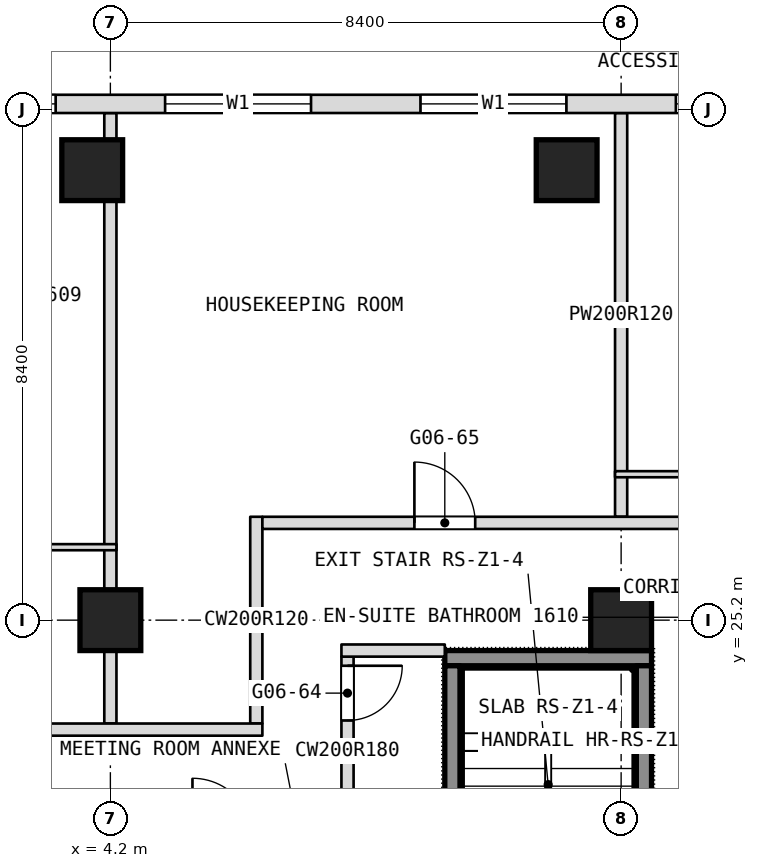
"""IFC4 building model, lengths in metres.
Left out: names, types, materials, properties, quantities, classifications, styles, units other than length and angle.
Written with IfcOpenShell. Run it as: python <this file> out.ifc"""

import sys

from ifc_helpers import new_model, si_unit, direction, frame, frame_2d, origin, origin_2d, place, context, subcontext, project, spatial, rectangle, extrude, element, fill, save


model = new_model("IFC4")
c1 = context("Model", 3, precision=1e-05, world=origin(), true_north=direction((0.0, 1.0)))
c2 = subcontext(c1, "Body", "Model", "MODEL_VIEW")
j1 = project(units=[si_unit("LENGTHUNIT", "METRE"), si_unit("PLANEANGLEUNIT", "RADIAN")], contexts=[c1])
p1 = place(None, origin())
s1 = spatial("IfcSite", under=j1, at=p1, CompositionType="ELEMENT")
p2 = place(p1, origin())
s2 = spatial("IfcBuilding", under=s1, at=p2, CompositionType="ELEMENT")
p3 = place(p2, frame((0.0, 0.0, 72.5)))
s3 = spatial("IfcBuildingStorey", under=s2, at=p3, CompositionType="ELEMENT", Elevation=72.5)
for number, where, z_axis, x_axis in (
    (1, (4.2, 25.2, 0.0), (0.0, 0.0, 1.0), (1.0, 0.0, 0.0)),
    (2, (12.6, 25.2, 0.0), (0.0, 0.0, 1.0), (1.0, 0.0, 0.0)),
    (3, (3.901, 32.6, 0.0), (0.0, 0.0, 1.0), (1.0, 0.0, 0.0)),
    (4, (11.704, 32.6, 0.0), (0.0, 0.0, 1.0), (1.0, 0.0, 0.0)),
):
    element("IfcColumn", number, at=place(p3, frame(where, z_axis=z_axis, x_axis=x_axis)), inside=s3, PredefinedType="COLUMN", context=c2, shape_type="SweptSolid", body=[
        extrude(rectangle(XDim=1.0, YDim=1.0, at=origin_2d()), origin(), (0.0, 0.0, 1.0), 3.6),
    ])
p4 = place(p3, frame((12.6, 26.9, 0.0), z_axis=(0.0, 0.0, 1.0), x_axis=(0.0, 1.0, 0.0)))
e5 = element("IfcWall", 5, at=p4, inside=s3, PredefinedType="PARTITIONING", context=c2, shape_type="SweptSolid", body=[
    extrude(rectangle(XDim=6.64, YDim=0.2, at=frame_2d((3.32, 0.0))), origin(), (0.0, 0.0, 1.0), 3.34),
])
p5 = place(p3, frame((8.1, 21.5, 0.0), z_axis=(0.0, 0.0, 1.0), x_axis=(0.0, 1.0, 0.0)))
e6 = element("IfcWall", 6, at=p5, inside=s3, PredefinedType="PARTITIONING", context=c2, shape_type="SweptSolid", body=[
    extrude(rectangle(XDim=3.1, YDim=0.2, at=frame_2d((1.55, 0.0))), origin(), (0.0, 0.0, 1.0), 3.34),
])
p6 = place(p5, frame((2.05, 0.0, 0.0)))
e7 = element("IfcOpeningElement", 7, at=p6, cuts=e6, PredefinedType="OPENING", context=c2, shape_type="SweptSolid", body=[
    extrude(rectangle(XDim=0.9, YDim=2.1, at=frame_2d((0.45, 1.05))), frame((0.0, 0.1, 0.0), z_axis=(0.0, -1.0, 0.0), x_axis=(1.0, 0.0, 0.0)), (0.0, 0.0, 1.0), 0.2),
])
p7 = place(p3, frame((6.6, 23.5, 0.0), z_axis=(0.0, 0.0, 1.0), x_axis=(0.0, 1.0, 0.0)))
e8 = element("IfcWall", 8, at=p7, inside=s3, PredefinedType="PARTITIONING", context=c2, shape_type="SweptSolid", body=[
    extrude(rectangle(XDim=3.4, YDim=0.2, at=frame_2d((1.7, 0.0))), origin(), (0.0, 0.0, 1.0), 3.34),
])
p8 = place(p3, frame((4.2, 23.5, 0.0), z_axis=(0.0, 0.0, 1.0), x_axis=(0.0, 1.0, 0.0)))
e9 = element("IfcWall", 9, at=p8, inside=s3, PredefinedType="PARTITIONING", context=c2, shape_type="SweptSolid", body=[
    extrude(rectangle(XDim=10.04, YDim=0.2, at=frame_2d((5.02, 0.0))), origin(), (0.0, 0.0, 1.0), 3.34),
])
p9 = place(p3, frame((-16.7, 23.4, 0.0), z_axis=(0.0, 0.0, 1.0), x_axis=(1.0, 0.0, 0.0)))
e10 = element("IfcWall", 10, at=p9, inside=s3, PredefinedType="PARTITIONING", context=c2, shape_type="SweptSolid", body=[
    extrude(rectangle(XDim=23.4, YDim=0.2, at=frame_2d((11.7, 0.0))), origin(), (0.0, 0.0, 1.0), 3.34),
])
p10 = place(p9, frame((2.4, 0.0, 0.0)))
e11 = element("IfcOpeningElement", 11, at=p10, cuts=e10, PredefinedType="OPENING", context=c2, shape_type="SweptSolid", body=[
    extrude(rectangle(XDim=0.9, YDim=2.1, at=frame_2d((0.45, 1.05))), frame((0.0, 0.1, 0.0), z_axis=(0.0, -1.0, 0.0), x_axis=(1.0, 0.0, 0.0)), (0.0, 0.0, 1.0), 0.2),
])
p11 = place(p9, frame((5.65, 0.0, 0.0)))
e12 = element("IfcOpeningElement", 12, at=p11, cuts=e10, PredefinedType="OPENING", context=c2, shape_type="SweptSolid", body=[
    extrude(rectangle(XDim=1.1, YDim=2.1, at=frame_2d((0.55, 1.05))), frame((0.0, 0.1, 0.0), z_axis=(0.0, -1.0, 0.0), x_axis=(1.0, 0.0, 0.0)), (0.0, 0.0, 1.0), 0.2),
])
p12 = place(p9, frame((15.3, 0.0, 0.0)))
e13 = element("IfcOpeningElement", 13, at=p12, cuts=e10, PredefinedType="OPENING", context=c2, shape_type="SweptSolid", body=[
    extrude(rectangle(XDim=1.0, YDim=2.1, at=frame_2d((0.5, 1.05))), frame((0.0, 0.1, 0.0), z_axis=(0.0, -1.0, 0.0), x_axis=(1.0, 0.0, 0.0)), (0.0, 0.0, 1.0), 0.2),
])
p13 = place(p9, frame((17.1, 0.0, 0.0)))
e14 = element("IfcOpeningElement", 14, at=p13, cuts=e10, PredefinedType="OPENING", context=c2, shape_type="SweptSolid", body=[
    extrude(rectangle(XDim=1.0, YDim=2.1, at=frame_2d((0.5, 1.05))), frame((0.0, 0.1, 0.0), z_axis=(0.0, -1.0, 0.0), x_axis=(1.0, 0.0, 0.0)), (0.0, 0.0, 1.0), 0.2),
])
p14 = place(p3, frame((8.0, 24.7, 0.0), z_axis=(0.0, 0.0, 1.0), x_axis=(1.0, 0.0, 0.0)))
e15 = element("IfcWall", 15, at=p14, inside=s3, PredefinedType="PARTITIONING", context=c2, shape_type="SweptSolid", body=[
    extrude(rectangle(XDim=1.7, YDim=0.2, at=frame_2d((0.85, 0.0))), origin(), (0.0, 0.0, 1.0), 3.34),
])
p15 = place(p3, frame((1.75, 26.4, 0.0), z_axis=(0.0, 0.0, 1.0), x_axis=(1.0, 0.0, 0.0)))
e16 = element("IfcWall", 16, at=p15, inside=s3, PredefinedType="PARTITIONING", context=c2, shape_type="SweptSolid", body=[
    extrude(rectangle(XDim=2.55, YDim=0.1, at=frame_2d((1.275, 0.0))), origin(), (0.0, 0.0, 1.0), 3.34),
])
p16 = place(p15, frame((0.15, 0.0, 0.0)))
e17 = element("IfcOpeningElement", 17, at=p16, cuts=e16, PredefinedType="OPENING", context=c2, shape_type="SweptSolid", body=[
    extrude(rectangle(XDim=0.9, YDim=2.1, at=frame_2d((0.45, 1.05))), frame((0.0, 0.05, 0.0), z_axis=(0.0, -1.0, 0.0), x_axis=(1.0, 0.0, 0.0)), (0.0, 0.0, 1.0), 0.1),
])
p17 = place(p3, frame((6.7, 26.8, 0.0), z_axis=(0.0, 0.0, 1.0), x_axis=(1.0, 0.0, 0.0)))
e18 = element("IfcWall", 18, at=p17, inside=s3, PredefinedType="PARTITIONING", context=c2, shape_type="SweptSolid", body=[
    extrude(rectangle(XDim=8.0, YDim=0.2, at=frame_2d((4.0, 0.0))), origin(), (0.0, 0.0, 1.0), 3.34),
])
p18 = place(p17, frame((2.5, 0.0, 0.0)))
e19 = element("IfcOpeningElement", 19, at=p18, cuts=e18, PredefinedType="OPENING", context=c2, shape_type="SweptSolid", body=[
    extrude(rectangle(XDim=1.0, YDim=2.1, at=frame_2d((0.5, 1.05))), frame((0.0, 0.1, 0.0), z_axis=(0.0, -1.0, 0.0), x_axis=(1.0, 0.0, 0.0)), (0.0, 0.0, 1.0), 0.2),
])
p19 = place(p3, frame((12.5, 27.6, 0.0), z_axis=(0.0, 0.0, 1.0), x_axis=(1.0, 0.0, 0.0)))
e20 = element("IfcWall", 20, at=p19, inside=s3, PredefinedType="PARTITIONING", context=c2, shape_type="SweptSolid", body=[
    extrude(rectangle(XDim=2.45, YDim=0.1, at=frame_2d((1.225, 0.0))), origin(), (0.0, 0.0, 1.0), 3.34),
])
p20 = place(p19, frame((1.4, 0.0, 0.0)))
e21 = element("IfcOpeningElement", 21, at=p20, cuts=e20, PredefinedType="OPENING", context=c2, shape_type="SweptSolid", body=[
    extrude(rectangle(XDim=0.9, YDim=2.1, at=frame_2d((0.45, 1.05))), frame((0.0, 0.05, 0.0), z_axis=(0.0, -1.0, 0.0), x_axis=(1.0, 0.0, 0.0)), (0.0, 0.0, 1.0), 0.1),
])
p21 = place(p3, frame((23.406, 33.69, 0.0), z_axis=(0.0, 0.0, 1.0), x_axis=(-1.0, 0.0, 0.0)))
e22 = element("IfcWall", 22, at=p21, inside=s3, PredefinedType="NOTDEFINED", context=c2, shape_type="SweptSolid", body=[
    extrude(rectangle(XDim=46.812, YDim=0.3, at=frame_2d((23.406, 0.0))), origin(), (0.0, 0.0, 1.0), 3.6),
])
p22 = place(p21, frame((2.186, 0.0, 0.9)))
e23 = element("IfcOpeningElement", 23, at=p22, cuts=e22, PredefinedType="OPENING", context=c2, shape_type="SweptSolid", body=[
    extrude(rectangle(XDim=2.4, YDim=2.1, at=frame_2d((1.2, 1.05))), frame((0.0, 0.15, 0.0), z_axis=(0.0, -1.0, 0.0), x_axis=(1.0, 0.0, 0.0)), (0.0, 0.0, 1.0), 0.3),
])
p23 = place(p21, frame((7.506, 0.0, 0.9)))
e24 = element("IfcOpeningElement", 24, at=p23, cuts=e22, PredefinedType="OPENING", context=c2, shape_type="SweptSolid", body=[
    extrude(rectangle(XDim=2.4, YDim=2.1, at=frame_2d((1.2, 1.05))), frame((0.0, 0.15, 0.0), z_axis=(0.0, -1.0, 0.0), x_axis=(1.0, 0.0, 0.0)), (0.0, 0.0, 1.0), 0.3),
])
p24 = place(p21, frame((11.706, 0.0, 0.9)))
e25 = element("IfcOpeningElement", 25, at=p24, cuts=e22, PredefinedType="OPENING", context=c2, shape_type="SweptSolid", body=[
    extrude(rectangle(XDim=2.4, YDim=2.1, at=frame_2d((1.2, 1.05))), frame((0.0, 0.15, 0.0), z_axis=(0.0, -1.0, 0.0), x_axis=(1.0, 0.0, 0.0)), (0.0, 0.0, 1.0), 0.3),
])
p25 = place(p21, frame((15.906, 0.0, 0.9)))
e26 = element("IfcOpeningElement", 26, at=p25, cuts=e22, PredefinedType="OPENING", context=c2, shape_type="SweptSolid", body=[
    extrude(rectangle(XDim=2.4, YDim=2.1, at=frame_2d((1.2, 1.05))), frame((0.0, 0.15, 0.0), z_axis=(0.0, -1.0, 0.0), x_axis=(1.0, 0.0, 0.0)), (0.0, 0.0, 1.0), 0.3),
])
p26 = place(p21, frame((20.106, 0.0, 0.9)))
e27 = element("IfcOpeningElement", 27, at=p26, cuts=e22, PredefinedType="OPENING", context=c2, shape_type="SweptSolid", body=[
    extrude(rectangle(XDim=2.4, YDim=2.1, at=frame_2d((1.2, 1.05))), frame((0.0, 0.15, 0.0), z_axis=(0.0, -1.0, 0.0), x_axis=(1.0, 0.0, 0.0)), (0.0, 0.0, 1.0), 0.3),
])
p27 = place(p21, frame((24.306, 0.0, 0.9)))
e28 = element("IfcOpeningElement", 28, at=p27, cuts=e22, PredefinedType="OPENING", context=c2, shape_type="SweptSolid", body=[
    extrude(rectangle(XDim=2.4, YDim=2.1, at=frame_2d((1.2, 1.05))), frame((0.0, 0.15, 0.0), z_axis=(0.0, -1.0, 0.0), x_axis=(1.0, 0.0, 0.0)), (0.0, 0.0, 1.0), 0.3),
])
p28 = place(p21, frame((28.506, 0.0, 0.9)))
e29 = element("IfcOpeningElement", 29, at=p28, cuts=e22, PredefinedType="OPENING", context=c2, shape_type="SweptSolid", body=[
    extrude(rectangle(XDim=2.4, YDim=2.1, at=frame_2d((1.2, 1.05))), frame((0.0, 0.15, 0.0), z_axis=(0.0, -1.0, 0.0), x_axis=(1.0, 0.0, 0.0)), (0.0, 0.0, 1.0), 0.3),
])
p29 = place(p21, frame((32.706, 0.0, 0.9)))
e30 = element("IfcOpeningElement", 30, at=p29, cuts=e22, PredefinedType="OPENING", context=c2, shape_type="SweptSolid", body=[
    extrude(rectangle(XDim=2.4, YDim=2.1, at=frame_2d((1.2, 1.05))), frame((0.0, 0.15, 0.0), z_axis=(0.0, -1.0, 0.0), x_axis=(1.0, 0.0, 0.0)), (0.0, 0.0, 1.0), 0.3),
])
p30 = place(p21, frame((36.906, 0.0, 0.9)))
e31 = element("IfcOpeningElement", 31, at=p30, cuts=e22, PredefinedType="OPENING", context=c2, shape_type="SweptSolid", body=[
    extrude(rectangle(XDim=2.4, YDim=2.1, at=frame_2d((1.2, 1.05))), frame((0.0, 0.15, 0.0), z_axis=(0.0, -1.0, 0.0), x_axis=(1.0, 0.0, 0.0)), (0.0, 0.0, 1.0), 0.3),
])
p31 = place(p21, frame((42.226, 0.0, 0.9)))
e32 = element("IfcOpeningElement", 32, at=p31, cuts=e22, PredefinedType="OPENING", context=c2, shape_type="SweptSolid", body=[
    extrude(rectangle(XDim=2.4, YDim=2.1, at=frame_2d((1.2, 1.05))), frame((0.0, 0.15, 0.0), z_axis=(0.0, -1.0, 0.0), x_axis=(1.0, 0.0, 0.0)), (0.0, 0.0, 1.0), 0.3),
])
p32 = place(p3, frame((9.7, 24.575, 0.1), z_axis=(0.0, 0.0, 1.0), x_axis=(1.0, 0.0, 0.0)))
e33 = element("IfcWall", 33, at=p32, inside=s3, PredefinedType="SHEAR", context=c2, shape_type="SweptSolid", body=[
    extrude(rectangle(XDim=3.4, YDim=0.25, at=frame_2d((1.7, 0.0))), origin(), (0.0, 0.0, 1.0), 3.6),
])
p33 = place(p3, frame((9.825, 18.75, 0.1), z_axis=(0.0, 0.0, 1.0), x_axis=(0.0, 1.0, 0.0)))
e34 = element("IfcWall", 34, at=p33, inside=s3, PredefinedType="SHEAR", context=c2, shape_type="SweptSolid", body=[
    extrude(rectangle(XDim=5.7, YDim=0.25, at=frame_2d((2.85, 0.0))), origin(), (0.0, 0.0, 1.0), 3.6),
])
p34 = place(p33, frame((0.2, 0.0, 0.0)))
e35 = element("IfcOpeningElement", 35, at=p34, cuts=e34, PredefinedType="OPENING", context=c2, shape_type="SweptSolid", body=[
    extrude(rectangle(XDim=1.0, YDim=2.1, at=frame_2d((0.5, 1.05))), frame((0.0, 0.125, 0.0), z_axis=(0.0, -1.0, 0.0), x_axis=(1.0, 0.0, 0.0)), (0.0, 0.0, 1.0), 0.25),
])
p35 = place(p3, frame((12.975, 18.75, 0.1), z_axis=(0.0, 0.0, 1.0), x_axis=(0.0, 1.0, 0.0)))
e36 = element("IfcWall", 36, at=p35, inside=s3, PredefinedType="SHEAR", context=c2, shape_type="SweptSolid", body=[
    extrude(rectangle(XDim=5.7, YDim=0.25, at=frame_2d((2.85, 0.0))), origin(), (0.0, 0.0, 1.0), 3.6),
])
p36 = place(p6, origin())
e37 = element("IfcDoor", 37, at=p36, inside=s3, OperationType="SINGLE_SWING_LEFT", PredefinedType="DOOR", context=c2, shape_type="SweptSolid", body=[
    extrude(rectangle(XDim=0.9, YDim=2.1, at=frame_2d((0.45, 1.05))), frame((0.0, 0.025, 0.0), z_axis=(0.0, -1.0, 0.0), x_axis=(1.0, 0.0, 0.0)), (0.0, 0.0, 1.0), 0.05),
])
fill(e7, e37)
p37 = place(p18, origin())
e38 = element("IfcDoor", 38, at=p37, inside=s3, OperationType="SINGLE_SWING_LEFT", PredefinedType="DOOR", context=c2, shape_type="SweptSolid", body=[
    extrude(rectangle(XDim=1.0, YDim=2.1, at=frame_2d((0.5, 1.05))), frame((0.0, 0.025, 0.0), z_axis=(0.0, -1.0, 0.0), x_axis=(1.0, 0.0, 0.0)), (0.0, 0.0, 1.0), 0.05),
])
fill(e19, e38)
p38 = place(p23, origin())
e39 = element("IfcWindow", 39, at=p38, inside=s3, PartitioningType="SINGLE_PANEL", PredefinedType="WINDOW", context=c2, shape_type="SweptSolid", body=[
    extrude(rectangle(XDim=2.4, YDim=2.1, at=frame_2d((1.2, 1.05))), frame((0.0, 0.03, 0.0), z_axis=(0.0, -1.0, 0.0), x_axis=(1.0, 0.0, 0.0)), (0.0, 0.0, 1.0), 0.06),
])
fill(e24, e39)
p39 = place(p24, origin())
e40 = element("IfcWindow", 40, at=p39, inside=s3, PartitioningType="SINGLE_PANEL", PredefinedType="WINDOW", context=c2, shape_type="SweptSolid", body=[
    extrude(rectangle(XDim=2.4, YDim=2.1, at=frame_2d((1.2, 1.05))), frame((0.0, 0.03, 0.0), z_axis=(0.0, -1.0, 0.0), x_axis=(1.0, 0.0, 0.0)), (0.0, 0.0, 1.0), 0.06),
])
fill(e25, e40)
p40 = place(p25, origin())
e41 = element("IfcWindow", 41, at=p40, inside=s3, PartitioningType="SINGLE_PANEL", PredefinedType="WINDOW", context=c2, shape_type="SweptSolid", body=[
    extrude(rectangle(XDim=2.4, YDim=2.1, at=frame_2d((1.2, 1.05))), frame((0.0, 0.03, 0.0), z_axis=(0.0, -1.0, 0.0), x_axis=(1.0, 0.0, 0.0)), (0.0, 0.0, 1.0), 0.06),
])
fill(e26, e41)
p41 = place(p26, origin())
e42 = element("IfcWindow", 42, at=p41, inside=s3, PartitioningType="SINGLE_PANEL", PredefinedType="WINDOW", context=c2, shape_type="SweptSolid", body=[
    extrude(rectangle(XDim=2.4, YDim=2.1, at=frame_2d((1.2, 1.05))), frame((0.0, 0.03, 0.0), z_axis=(0.0, -1.0, 0.0), x_axis=(1.0, 0.0, 0.0)), (0.0, 0.0, 1.0), 0.06),
])
fill(e27, e42)
save(model, sys.argv[1])
